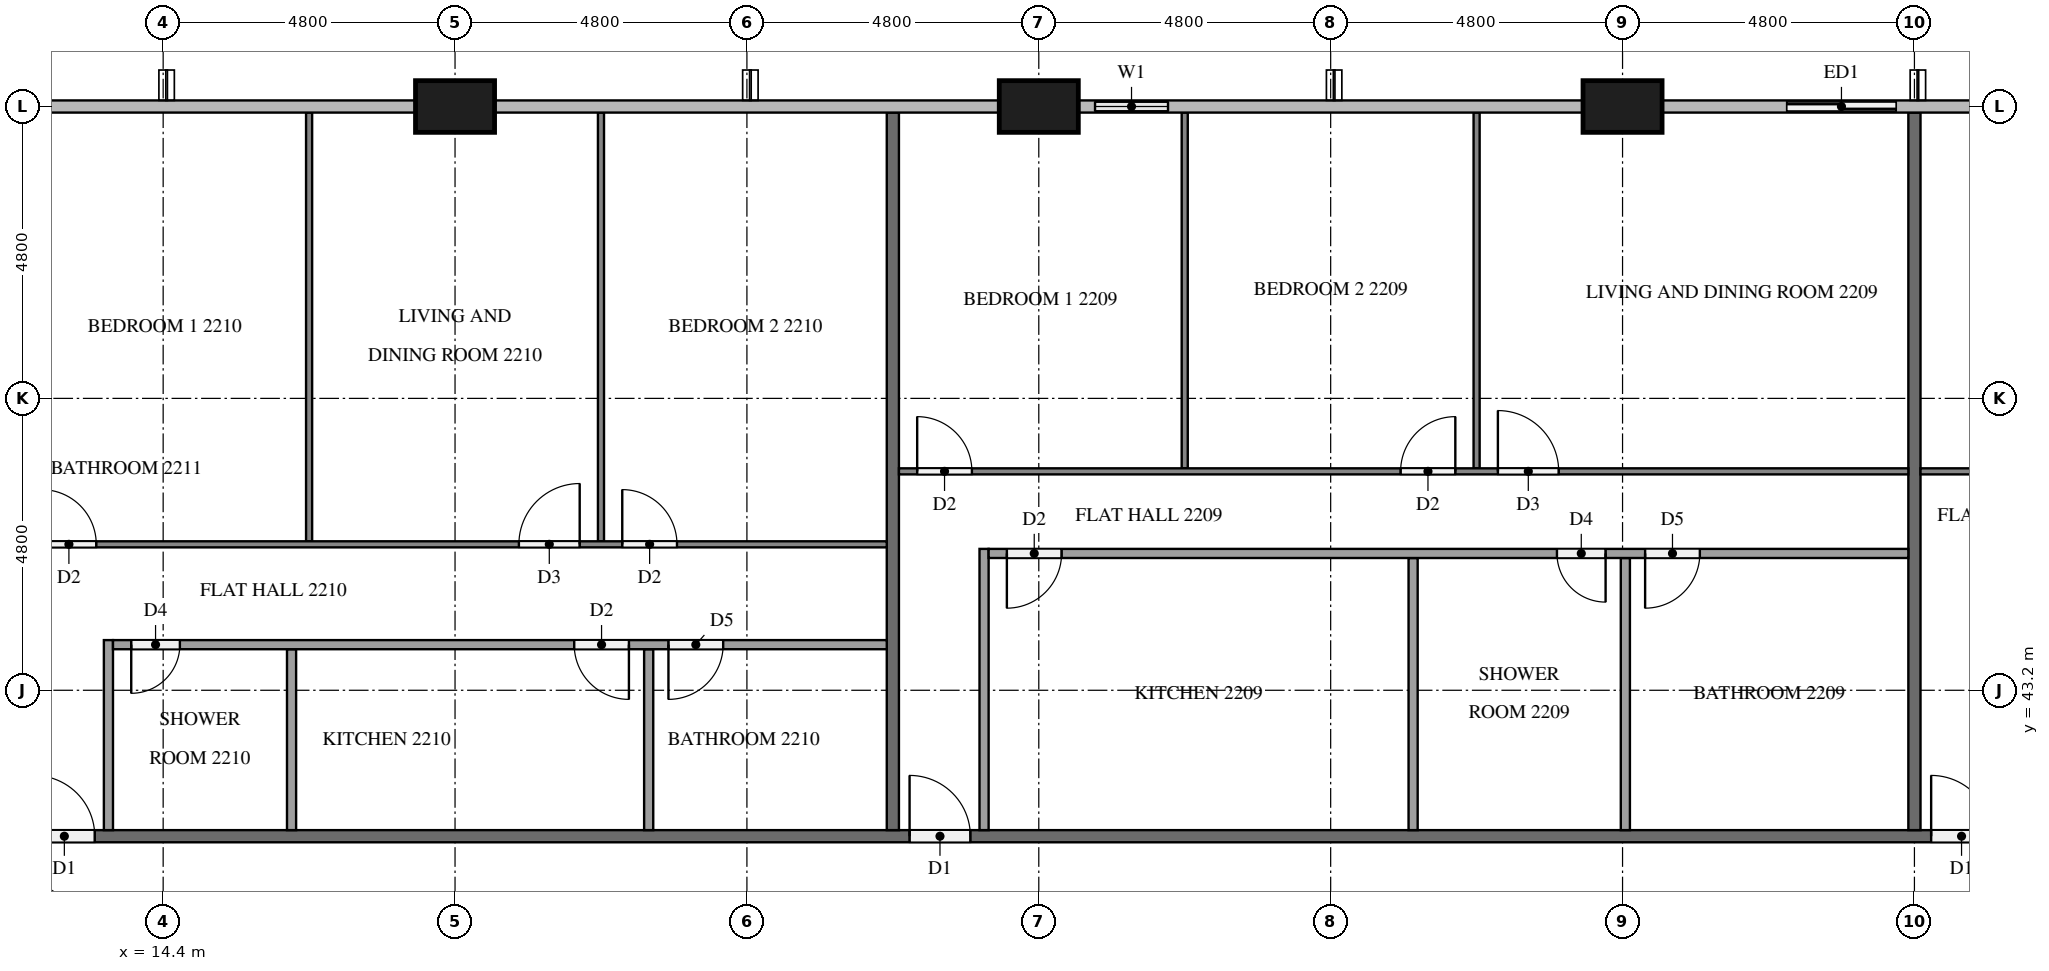
"""IFC4 building model, lengths in metres.
Left out: names, types, materials, properties, quantities, classifications, styles, units other than length and angle.
Written with IfcOpenShell. Run it as: python <this file> out.ifc"""

import sys

from ifc_helpers import new_model, si_unit, direction, frame, frame_2d, origin, origin_2d, place, context, subcontext, project, spatial, rectangle, extrude, element, fill, save


model = new_model("IFC4")
c1 = context("Model", 3, precision=1e-05, world=origin(), true_north=direction((0.0, 1.0)))
c2 = subcontext(c1, "Body", "Model", "MODEL_VIEW")
j1 = project(units=[si_unit("LENGTHUNIT", "METRE"), si_unit("PLANEANGLEUNIT", "RADIAN")], contexts=[c1])
p1 = place(None, origin())
s1 = spatial("IfcSite", under=j1, at=p1, CompositionType="ELEMENT")
p2 = place(p1, origin())
s2 = spatial("IfcBuilding", under=s1, at=p2, CompositionType="ELEMENT")
p3 = place(p2, frame((0.0, 0.0, 89.2)))
s3 = spatial("IfcBuildingStorey", under=s2, at=p3, CompositionType="ELEMENT", Elevation=89.2)
for number, where, z_axis, x_axis in (
    (1, (38.4, 52.8, 0.0), (0.0, 0.0, 1.0), (1.0, 0.0, 0.0)),
    (2, (28.8, 52.8, 0.0), (0.0, 0.0, 1.0), (1.0, 0.0, 0.0)),
    (3, (19.2, 52.8, 0.0), (0.0, 0.0, 1.0), (1.0, 0.0, 0.0)),
):
    element("IfcColumn", number, at=place(p3, frame(where, z_axis=z_axis, x_axis=x_axis)), inside=s3, PredefinedType="COLUMN", context=c2, shape_type="SweptSolid", body=[
        extrude(rectangle(XDim=1.3, YDim=0.85, at=origin_2d()), origin(), (0.0, 0.0, 1.0), 3.2),
    ])
p4 = place(p3, frame((43.2, 52.8, 0.0), z_axis=(0.0, 0.0, 1.0), x_axis=(-1.0, 0.0, 0.0)))
e4 = element("IfcWall", 4, at=p4, inside=s3, PredefinedType="SOLIDWALL", context=c2, shape_type="SweptSolid", body=[
    extrude(rectangle(XDim=2.4, YDim=0.15, at=frame_2d((1.2, 0.0))), origin(), (0.0, 0.0, 1.0), 3.2),
])
p5 = place(p4, frame((0.3, 0.0, 0.0)))
e5 = element("IfcOpeningElement", 5, at=p5, cuts=e4, PredefinedType="OPENING", context=c2, shape_type="SweptSolid", body=[
    extrude(rectangle(XDim=1.8, YDim=2.4, at=frame_2d((0.9, 1.2))), frame((0.0, 0.085, 0.0), z_axis=(0.0, -1.0, 0.0), x_axis=(1.0, 0.0, 0.0)), (0.0, 0.0, 1.0), 0.17),
])
p6 = place(p3, frame((31.2, 52.8, 0.0), z_axis=(0.0, 0.0, 1.0), x_axis=(-1.0, 0.0, 0.0)))
e6 = element("IfcWall", 6, at=p6, inside=s3, PredefinedType="SOLIDWALL", context=c2, shape_type="SweptSolid", body=[
    extrude(rectangle(XDim=1.75, YDim=0.15, at=frame_2d((0.875, 0.0))), origin(), (0.0, 0.0, 1.0), 3.2),
])
p7 = place(p6, frame((0.275, 0.0, 0.9)))
e7 = element("IfcOpeningElement", 7, at=p7, cuts=e6, PredefinedType="OPENING", context=c2, shape_type="SweptSolid", body=[
    extrude(rectangle(XDim=1.2, YDim=1.4, at=frame_2d((0.6, 0.7))), frame((0.0, 0.085, 0.0), z_axis=(0.0, -1.0, 0.0), x_axis=(1.0, 0.0, 0.0)), (0.0, 0.0, 1.0), 0.17),
])
p8 = place(p3, frame((11.9, 40.8, 0.0), z_axis=(0.0, 0.0, 1.0), x_axis=(1.0, 0.0, 0.0)))
e8 = element("IfcWall", 8, at=p8, inside=s3, PredefinedType="PARTITIONING", context=c2, shape_type="SweptSolid", body=[
    extrude(rectangle(XDim=38.6, YDim=0.2, at=frame_2d((19.3, 0.0))), origin(), (0.0, 0.0, 1.0), 3.2),
])
p9 = place(p8, frame((31.575, 0.0, 0.0)))
e9 = element("IfcOpeningElement", 9, at=p9, cuts=e8, PredefinedType="OPENING", context=c2, shape_type="SweptSolid", body=[
    extrude(rectangle(XDim=1.0, YDim=2.1, at=frame_2d((0.5, 1.05))), frame((0.0, 0.11, 0.0), z_axis=(0.0, -1.0, 0.0), x_axis=(1.0, 0.0, 0.0)), (0.0, 0.0, 1.0), 0.22),
])
p10 = place(p8, frame((14.775, 0.0, 0.0)))
e10 = element("IfcOpeningElement", 10, at=p10, cuts=e8, PredefinedType="OPENING", context=c2, shape_type="SweptSolid", body=[
    extrude(rectangle(XDim=1.0, YDim=2.1, at=frame_2d((0.5, 1.05))), frame((0.0, 0.11, 0.0), z_axis=(0.0, -1.0, 0.0), x_axis=(1.0, 0.0, 0.0)), (0.0, 0.0, 1.0), 0.22),
])
p11 = place(p8, frame((0.375, 0.0, 0.0)))
e11 = element("IfcOpeningElement", 11, at=p11, cuts=e8, PredefinedType="OPENING", context=c2, shape_type="SweptSolid", body=[
    extrude(rectangle(XDim=1.0, YDim=2.1, at=frame_2d((0.5, 1.05))), frame((0.0, 0.11, 0.0), z_axis=(0.0, -1.0, 0.0), x_axis=(1.0, 0.0, 0.0)), (0.0, 0.0, 1.0), 0.22),
])
for number, where, z_axis, x_axis in (
    (12, (43.2, 52.7, 0.0), (0.0, 0.0, 1.0), (0.0, -1.0, 0.0)),
    (13, (26.4, 52.7, 0.0), (0.0, 0.0, 1.0), (0.0, -1.0, 0.0)),
):
    element("IfcWall", number, at=place(p3, frame(where, z_axis=z_axis, x_axis=x_axis)), inside=s3, PredefinedType="PARTITIONING", context=c2, shape_type="SweptSolid", body=[
        extrude(rectangle(XDim=11.8, YDim=0.2, at=frame_2d((5.9, 0.0))), origin(), (0.0, 0.0, 1.0), 3.2),
    ])
p12 = place(p3, frame((43.3, 46.8, 0.0), z_axis=(0.0, 0.0, 1.0), x_axis=(1.0, 0.0, 0.0)))
e14 = element("IfcWall", 14, at=p12, inside=s3, PredefinedType="PARTITIONING", context=c2, shape_type="SweptSolid", body=[
    extrude(rectangle(XDim=7.0, YDim=0.1, at=frame_2d((3.5, 0.0))), origin(), (0.0, 0.0, 1.0), 3.2),
])
p13 = place(p12, frame((5.7, 0.0, 0.0)))
e15 = element("IfcOpeningElement", 15, at=p13, cuts=e14, PredefinedType="OPENING", context=c2, shape_type="SweptSolid", body=[
    extrude(rectangle(XDim=1.0, YDim=2.1, at=frame_2d((0.5, 1.05))), frame((0.0, 0.06, 0.0), z_axis=(0.0, -1.0, 0.0), x_axis=(1.0, 0.0, 0.0)), (0.0, 0.0, 1.0), 0.12),
])
for number, where, z_axis, x_axis in (
    (16, (31.2, 46.85, 0.0), (0.0, 0.0, 1.0), (0.0, 1.0, 0.0)),
    (17, (36.0, 46.85, 0.0), (0.0, 0.0, 1.0), (0.0, 1.0, 0.0)),
):
    element("IfcWall", number, at=place(p3, frame(where, z_axis=z_axis, x_axis=x_axis)), inside=s3, PredefinedType="PARTITIONING", context=c2, shape_type="SweptSolid", body=[
        extrude(rectangle(XDim=5.85, YDim=0.1, at=frame_2d((2.925, 0.0))), origin(), (0.0, 0.0, 1.0), 3.2),
    ])
p14 = place(p3, frame((26.5, 46.8, 0.0), z_axis=(0.0, 0.0, 1.0), x_axis=(1.0, 0.0, 0.0)))
e18 = element("IfcWall", 18, at=p14, inside=s3, PredefinedType="PARTITIONING", context=c2, shape_type="SweptSolid", body=[
    extrude(rectangle(XDim=16.6, YDim=0.1, at=frame_2d((8.3, 0.0))), origin(), (0.0, 0.0, 1.0), 3.2),
])
p15 = place(p14, frame((0.3, 0.0, 0.0)))
e19 = element("IfcOpeningElement", 19, at=p15, cuts=e18, PredefinedType="OPENING", context=c2, shape_type="SweptSolid", body=[
    extrude(rectangle(XDim=0.9, YDim=2.1, at=frame_2d((0.45, 1.05))), frame((0.0, 0.06, 0.0), z_axis=(0.0, -1.0, 0.0), x_axis=(1.0, 0.0, 0.0)), (0.0, 0.0, 1.0), 0.12),
])
p16 = place(p14, frame((8.25, 0.0, 0.0)))
e20 = element("IfcOpeningElement", 20, at=p16, cuts=e18, PredefinedType="OPENING", context=c2, shape_type="SweptSolid", body=[
    extrude(rectangle(XDim=0.9, YDim=2.1, at=frame_2d((0.45, 1.05))), frame((0.0, 0.06, 0.0), z_axis=(0.0, -1.0, 0.0), x_axis=(1.0, 0.0, 0.0)), (0.0, 0.0, 1.0), 0.12),
])
p17 = place(p14, frame((9.85, 0.0, 0.0)))
e21 = element("IfcOpeningElement", 21, at=p17, cuts=e18, PredefinedType="OPENING", context=c2, shape_type="SweptSolid", body=[
    extrude(rectangle(XDim=1.0, YDim=2.1, at=frame_2d((0.5, 1.05))), frame((0.0, 0.06, 0.0), z_axis=(0.0, -1.0, 0.0), x_axis=(1.0, 0.0, 0.0)), (0.0, 0.0, 1.0), 0.12),
])
for number, where, z_axis, x_axis in (
    (22, (34.956, 40.9, 0.0), (0.0, 0.0, 1.0), (0.0, 1.0, 0.0)),
    (23, (38.446, 40.9, 0.0), (0.0, 0.0, 1.0), (0.0, 1.0, 0.0)),
):
    element("IfcWall", number, at=place(p3, frame(where, z_axis=z_axis, x_axis=x_axis)), inside=s3, PredefinedType="PARTITIONING", context=c2, shape_type="SweptSolid", body=[
        extrude(rectangle(XDim=4.475, YDim=0.15, at=frame_2d((2.238, 0.0))), origin(), (0.0, 0.0, 1.0), 3.2),
    ])
p18 = place(p3, frame((27.9, 40.9, 0.0), z_axis=(0.0, 0.0, 1.0), x_axis=(0.0, 1.0, 0.0)))
e24 = element("IfcWall", 24, at=p18, inside=s3, PredefinedType="PARTITIONING", context=c2, shape_type="SweptSolid", body=[
    extrude(rectangle(XDim=4.625, YDim=0.15, at=frame_2d((2.312, 0.0))), origin(), (0.0, 0.0, 1.0), 3.2),
])
p19 = place(p3, frame((43.1, 45.45, 0.0), z_axis=(0.0, 0.0, 1.0), x_axis=(-1.0, 0.0, 0.0)))
e25 = element("IfcWall", 25, at=p19, inside=s3, PredefinedType="PARTITIONING", context=c2, shape_type="SweptSolid", body=[
    extrude(rectangle(XDim=15.125, YDim=0.15, at=frame_2d((7.562, 0.0))), origin(), (0.0, 0.0, 1.0), 3.2),
])
p20 = place(p19, frame((13.925, 0.0, 0.0)))
e26 = element("IfcOpeningElement", 26, at=p20, cuts=e25, PredefinedType="OPENING", context=c2, shape_type="SweptSolid", body=[
    extrude(rectangle(XDim=0.9, YDim=2.1, at=frame_2d((0.45, 1.05))), frame((0.0, 0.085, 0.0), z_axis=(0.0, -1.0, 0.0), x_axis=(1.0, 0.0, 0.0)), (0.0, 0.0, 1.0), 0.17),
])
p21 = place(p19, frame((4.979, 0.0, 0.0)))
e27 = element("IfcOpeningElement", 27, at=p21, cuts=e25, PredefinedType="OPENING", context=c2, shape_type="SweptSolid", body=[
    extrude(rectangle(XDim=0.8, YDim=2.1, at=frame_2d((0.4, 1.05))), frame((0.0, 0.085, 0.0), z_axis=(0.0, -1.0, 0.0), x_axis=(1.0, 0.0, 0.0)), (0.0, 0.0, 1.0), 0.17),
])
p22 = place(p19, frame((3.429, 0.0, 0.0)))
e28 = element("IfcOpeningElement", 28, at=p22, cuts=e25, PredefinedType="OPENING", context=c2, shape_type="SweptSolid", body=[
    extrude(rectangle(XDim=0.9, YDim=2.1, at=frame_2d((0.45, 1.05))), frame((0.0, 0.085, 0.0), z_axis=(0.0, -1.0, 0.0), x_axis=(1.0, 0.0, 0.0)), (0.0, 0.0, 1.0), 0.17),
])
for number, where, z_axis, x_axis in (
    (29, (16.8, 45.65, 0.0), (0.0, 0.0, 1.0), (0.0, 1.0, 0.0)),
    (30, (21.6, 45.65, 0.0), (0.0, 0.0, 1.0), (0.0, 1.0, 0.0)),
):
    element("IfcWall", number, at=place(p3, frame(where, z_axis=z_axis, x_axis=x_axis)), inside=s3, PredefinedType="PARTITIONING", context=c2, shape_type="SweptSolid", body=[
        extrude(rectangle(XDim=7.05, YDim=0.1, at=frame_2d((3.525, 0.0))), origin(), (0.0, 0.0, 1.0), 3.2),
    ])
p23 = place(p3, frame((12.1, 45.6, 0.0), z_axis=(0.0, 0.0, 1.0), x_axis=(1.0, 0.0, 0.0)))
e31 = element("IfcWall", 31, at=p23, inside=s3, PredefinedType="PARTITIONING", context=c2, shape_type="SweptSolid", body=[
    extrude(rectangle(XDim=14.2, YDim=0.1, at=frame_2d((7.1, 0.0))), origin(), (0.0, 0.0, 1.0), 3.2),
])
p24 = place(p23, frame((0.3, 0.0, 0.0)))
e32 = element("IfcOpeningElement", 32, at=p24, cuts=e31, PredefinedType="OPENING", context=c2, shape_type="SweptSolid", body=[
    extrude(rectangle(XDim=0.9, YDim=2.1, at=frame_2d((0.45, 1.05))), frame((0.0, 0.06, 0.0), z_axis=(0.0, -1.0, 0.0), x_axis=(1.0, 0.0, 0.0)), (0.0, 0.0, 1.0), 0.12),
])
p25 = place(p23, frame((8.15, 0.0, 0.0)))
e33 = element("IfcOpeningElement", 33, at=p25, cuts=e31, PredefinedType="OPENING", context=c2, shape_type="SweptSolid", body=[
    extrude(rectangle(XDim=1.0, YDim=2.1, at=frame_2d((0.5, 1.05))), frame((0.0, 0.06, 0.0), z_axis=(0.0, -1.0, 0.0), x_axis=(1.0, 0.0, 0.0)), (0.0, 0.0, 1.0), 0.12),
])
p26 = place(p23, frame((9.85, 0.0, 0.0)))
e34 = element("IfcOpeningElement", 34, at=p26, cuts=e31, PredefinedType="OPENING", context=c2, shape_type="SweptSolid", body=[
    extrude(rectangle(XDim=0.9, YDim=2.1, at=frame_2d((0.45, 1.05))), frame((0.0, 0.06, 0.0), z_axis=(0.0, -1.0, 0.0), x_axis=(1.0, 0.0, 0.0)), (0.0, 0.0, 1.0), 0.12),
])
for number, where, z_axis, x_axis in (
    (35, (16.511, 40.9, 0.0), (0.0, 0.0, 1.0), (0.0, 1.0, 0.0)),
    (36, (22.385, 40.9, 0.0), (0.0, 0.0, 1.0), (0.0, 1.0, 0.0)),
):
    element("IfcWall", number, at=place(p3, frame(where, z_axis=z_axis, x_axis=x_axis)), inside=s3, PredefinedType="PARTITIONING", context=c2, shape_type="SweptSolid", body=[
        extrude(rectangle(XDim=2.975, YDim=0.15, at=frame_2d((1.488, 0.0))), origin(), (0.0, 0.0, 1.0), 3.2),
    ])
p27 = place(p3, frame((13.5, 40.9, 0.0), z_axis=(0.0, 0.0, 1.0), x_axis=(0.0, 1.0, 0.0)))
e37 = element("IfcWall", 37, at=p27, inside=s3, PredefinedType="PARTITIONING", context=c2, shape_type="SweptSolid", body=[
    extrude(rectangle(XDim=3.125, YDim=0.15, at=frame_2d((1.562, 0.0))), origin(), (0.0, 0.0, 1.0), 3.2),
])
p28 = place(p3, frame((26.3, 43.95, 0.0), z_axis=(0.0, 0.0, 1.0), x_axis=(-1.0, 0.0, 0.0)))
e38 = element("IfcWall", 38, at=p28, inside=s3, PredefinedType="PARTITIONING", context=c2, shape_type="SweptSolid", body=[
    extrude(rectangle(XDim=12.725, YDim=0.15, at=frame_2d((6.363, 0.0))), origin(), (0.0, 0.0, 1.0), 3.2),
])
p29 = place(p28, frame((11.625, 0.0, 0.0)))
e39 = element("IfcOpeningElement", 39, at=p29, cuts=e38, PredefinedType="OPENING", context=c2, shape_type="SweptSolid", body=[
    extrude(rectangle(XDim=0.8, YDim=2.1, at=frame_2d((0.4, 1.05))), frame((0.0, 0.085, 0.0), z_axis=(0.0, -1.0, 0.0), x_axis=(1.0, 0.0, 0.0)), (0.0, 0.0, 1.0), 0.17),
])
p30 = place(p28, frame((4.24, 0.0, 0.0)))
e40 = element("IfcOpeningElement", 40, at=p30, cuts=e38, PredefinedType="OPENING", context=c2, shape_type="SweptSolid", body=[
    extrude(rectangle(XDim=0.9, YDim=2.1, at=frame_2d((0.45, 1.05))), frame((0.0, 0.085, 0.0), z_axis=(0.0, -1.0, 0.0), x_axis=(1.0, 0.0, 0.0)), (0.0, 0.0, 1.0), 0.17),
])
p31 = place(p28, frame((2.69, 0.0, 0.0)))
e41 = element("IfcOpeningElement", 41, at=p31, cuts=e38, PredefinedType="OPENING", context=c2, shape_type="SweptSolid", body=[
    extrude(rectangle(XDim=0.9, YDim=2.1, at=frame_2d((0.45, 1.05))), frame((0.0, 0.085, 0.0), z_axis=(0.0, -1.0, 0.0), x_axis=(1.0, 0.0, 0.0)), (0.0, 0.0, 1.0), 0.17),
])
p32 = place(p5, origin())
e42 = element("IfcDoor", 42, at=p32, inside=s3, OperationType="SLIDING_TO_RIGHT", PredefinedType="DOOR", context=c2, shape_type="SweptSolid", body=[
    extrude(rectangle(XDim=1.8, YDim=2.4, at=frame_2d((0.9, 1.2))), frame((0.0, 0.025, 0.0), z_axis=(0.0, -1.0, 0.0), x_axis=(1.0, 0.0, 0.0)), (0.0, 0.0, 1.0), 0.05),
])
fill(e5, e42)
p33 = place(p7, origin())
e43 = element("IfcWindow", 43, at=p33, inside=s3, PartitioningType="SINGLE_PANEL", PredefinedType="WINDOW", context=c2, shape_type="SweptSolid", body=[
    extrude(rectangle(XDim=1.2, YDim=1.4, at=frame_2d((0.6, 0.7))), frame((0.0, 0.03, 0.0), z_axis=(0.0, -1.0, 0.0), x_axis=(1.0, 0.0, 0.0)), (0.0, 0.0, 1.0), 0.06),
])
fill(e7, e43)
p34 = place(p9, origin())
e44 = element("IfcDoor", 44, at=p34, inside=s3, OperationType="SINGLE_SWING_LEFT", PredefinedType="DOOR", context=c2, shape_type="SweptSolid", body=[
    extrude(rectangle(XDim=1.0, YDim=2.1, at=frame_2d((0.5, 1.05))), frame((0.0, 0.025, 0.0), z_axis=(0.0, -1.0, 0.0), x_axis=(1.0, 0.0, 0.0)), (0.0, 0.0, 1.0), 0.05),
])
fill(e9, e44)
p35 = place(p10, origin())
e45 = element("IfcDoor", 45, at=p35, inside=s3, OperationType="SINGLE_SWING_LEFT", PredefinedType="DOOR", context=c2, shape_type="SweptSolid", body=[
    extrude(rectangle(XDim=1.0, YDim=2.1, at=frame_2d((0.5, 1.05))), frame((0.0, 0.025, 0.0), z_axis=(0.0, -1.0, 0.0), x_axis=(1.0, 0.0, 0.0)), (0.0, 0.0, 1.0), 0.05),
])
fill(e10, e45)
p36 = place(p11, origin())
e46 = element("IfcDoor", 46, at=p36, inside=s3, OperationType="SINGLE_SWING_LEFT", PredefinedType="DOOR", context=c2, shape_type="SweptSolid", body=[
    extrude(rectangle(XDim=1.0, YDim=2.1, at=frame_2d((0.5, 1.05))), frame((0.0, 0.025, 0.0), z_axis=(0.0, -1.0, 0.0), x_axis=(1.0, 0.0, 0.0)), (0.0, 0.0, 1.0), 0.05),
])
fill(e11, e46)
p37 = place(p15, origin())
e47 = element("IfcDoor", 47, at=p37, inside=s3, OperationType="SINGLE_SWING_LEFT", PredefinedType="DOOR", context=c2, shape_type="SweptSolid", body=[
    extrude(rectangle(XDim=0.9, YDim=2.1, at=frame_2d((0.45, 1.05))), frame((0.0, 0.025, 0.0), z_axis=(0.0, -1.0, 0.0), x_axis=(1.0, 0.0, 0.0)), (0.0, 0.0, 1.0), 0.05),
])
fill(e19, e47)
p38 = place(p16, origin())
e48 = element("IfcDoor", 48, at=p38, inside=s3, OperationType="SINGLE_SWING_RIGHT", PredefinedType="DOOR", context=c2, shape_type="SweptSolid", body=[
    extrude(rectangle(XDim=0.9, YDim=2.1, at=frame_2d((0.45, 1.05))), frame((0.0, 0.025, 0.0), z_axis=(0.0, -1.0, 0.0), x_axis=(1.0, 0.0, 0.0)), (0.0, 0.0, 1.0), 0.05),
])
fill(e20, e48)
p39 = place(p17, origin())
e49 = element("IfcDoor", 49, at=p39, inside=s3, OperationType="SINGLE_SWING_LEFT", PredefinedType="DOOR", context=c2, shape_type="SweptSolid", body=[
    extrude(rectangle(XDim=1.0, YDim=2.1, at=frame_2d((0.5, 1.05))), frame((0.0, 0.025, 0.0), z_axis=(0.0, -1.0, 0.0), x_axis=(1.0, 0.0, 0.0)), (0.0, 0.0, 1.0), 0.05),
])
fill(e21, e49)
p40 = place(p20, origin())
e50 = element("IfcDoor", 50, at=p40, inside=s3, OperationType="SINGLE_SWING_RIGHT", PredefinedType="DOOR", context=c2, shape_type="SweptSolid", body=[
    extrude(rectangle(XDim=0.9, YDim=2.1, at=frame_2d((0.45, 1.05))), frame((0.0, 0.025, 0.0), z_axis=(0.0, -1.0, 0.0), x_axis=(1.0, 0.0, 0.0)), (0.0, 0.0, 1.0), 0.05),
])
fill(e26, e50)
p41 = place(p21, origin())
e51 = element("IfcDoor", 51, at=p41, inside=s3, OperationType="SINGLE_SWING_LEFT", PredefinedType="DOOR", context=c2, shape_type="SweptSolid", body=[
    extrude(rectangle(XDim=0.8, YDim=2.1, at=frame_2d((0.4, 1.05))), frame((0.0, 0.025, 0.0), z_axis=(0.0, -1.0, 0.0), x_axis=(1.0, 0.0, 0.0)), (0.0, 0.0, 1.0), 0.05),
])
fill(e27, e51)
p42 = place(p22, origin())
e52 = element("IfcDoor", 52, at=p42, inside=s3, OperationType="SINGLE_SWING_RIGHT", PredefinedType="DOOR", context=c2, shape_type="SweptSolid", body=[
    extrude(rectangle(XDim=0.9, YDim=2.1, at=frame_2d((0.45, 1.05))), frame((0.0, 0.025, 0.0), z_axis=(0.0, -1.0, 0.0), x_axis=(1.0, 0.0, 0.0)), (0.0, 0.0, 1.0), 0.05),
])
fill(e28, e52)
p43 = place(p24, origin())
e53 = element("IfcDoor", 53, at=p43, inside=s3, OperationType="SINGLE_SWING_LEFT", PredefinedType="DOOR", context=c2, shape_type="SweptSolid", body=[
    extrude(rectangle(XDim=0.9, YDim=2.1, at=frame_2d((0.45, 1.05))), frame((0.0, 0.025, 0.0), z_axis=(0.0, -1.0, 0.0), x_axis=(1.0, 0.0, 0.0)), (0.0, 0.0, 1.0), 0.05),
])
fill(e32, e53)
p44 = place(p25, origin())
e54 = element("IfcDoor", 54, at=p44, inside=s3, OperationType="SINGLE_SWING_RIGHT", PredefinedType="DOOR", context=c2, shape_type="SweptSolid", body=[
    extrude(rectangle(XDim=1.0, YDim=2.1, at=frame_2d((0.5, 1.05))), frame((0.0, 0.025, 0.0), z_axis=(0.0, -1.0, 0.0), x_axis=(1.0, 0.0, 0.0)), (0.0, 0.0, 1.0), 0.05),
])
fill(e33, e54)
p45 = place(p26, origin())
e55 = element("IfcDoor", 55, at=p45, inside=s3, OperationType="SINGLE_SWING_LEFT", PredefinedType="DOOR", context=c2, shape_type="SweptSolid", body=[
    extrude(rectangle(XDim=0.9, YDim=2.1, at=frame_2d((0.45, 1.05))), frame((0.0, 0.025, 0.0), z_axis=(0.0, -1.0, 0.0), x_axis=(1.0, 0.0, 0.0)), (0.0, 0.0, 1.0), 0.05),
])
fill(e34, e55)
p46 = place(p29, origin())
e56 = element("IfcDoor", 56, at=p46, inside=s3, OperationType="SINGLE_SWING_RIGHT", PredefinedType="DOOR", context=c2, shape_type="SweptSolid", body=[
    extrude(rectangle(XDim=0.8, YDim=2.1, at=frame_2d((0.4, 1.05))), frame((0.0, 0.025, 0.0), z_axis=(0.0, -1.0, 0.0), x_axis=(1.0, 0.0, 0.0)), (0.0, 0.0, 1.0), 0.05),
])
fill(e39, e56)
p47 = place(p30, origin())
e57 = element("IfcDoor", 57, at=p47, inside=s3, OperationType="SINGLE_SWING_LEFT", PredefinedType="DOOR", context=c2, shape_type="SweptSolid", body=[
    extrude(rectangle(XDim=0.9, YDim=2.1, at=frame_2d((0.45, 1.05))), frame((0.0, 0.025, 0.0), z_axis=(0.0, -1.0, 0.0), x_axis=(1.0, 0.0, 0.0)), (0.0, 0.0, 1.0), 0.05),
])
fill(e40, e57)
p48 = place(p31, origin())
e58 = element("IfcDoor", 58, at=p48, inside=s3, OperationType="SINGLE_SWING_RIGHT", PredefinedType="DOOR", context=c2, shape_type="SweptSolid", body=[
    extrude(rectangle(XDim=0.9, YDim=2.1, at=frame_2d((0.45, 1.05))), frame((0.0, 0.025, 0.0), z_axis=(0.0, -1.0, 0.0), x_axis=(1.0, 0.0, 0.0)), (0.0, 0.0, 1.0), 0.05),
])
fill(e41, e58)
save(model, sys.argv[1])
